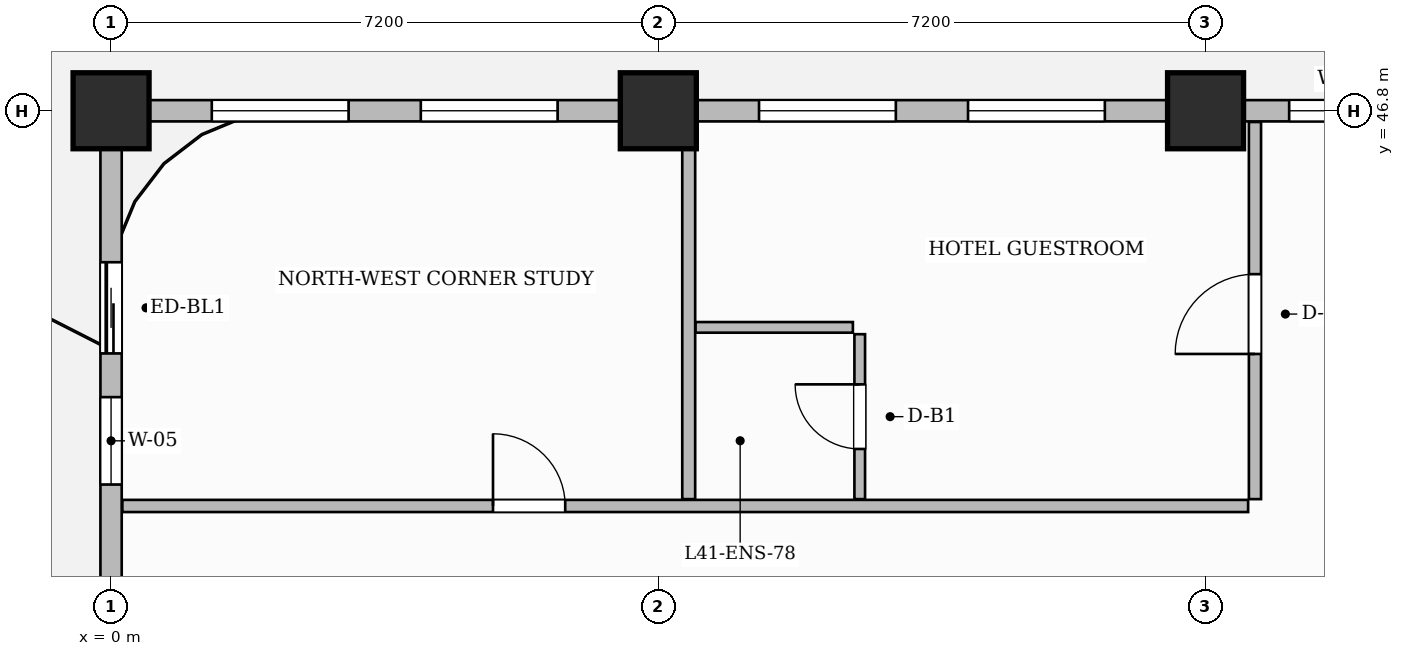
"""IFC4 building model, lengths in metres.
Left out: names, types, materials, properties, quantities, classifications, styles, units other than length and angle.
Written with IfcOpenShell. Run it as: python <this file> out.ifc"""

import sys

from ifc_helpers import new_model, si_unit, direction, frame, frame_2d, origin, origin_2d, place, context, subcontext, project, spatial, rectangle, extrude, source, transform, mapped, element, fill, save


model = new_model("IFC4")
c1 = context("Model", 3, precision=1e-05, world=origin(), true_north=direction((0.0, 1.0)))
c2 = subcontext(c1, "Body", "Model", "MODEL_VIEW")
j1 = project(units=[si_unit("LENGTHUNIT", "METRE"), si_unit("PLANEANGLEUNIT", "RADIAN")], contexts=[c1])
p1 = place(None, origin())
s1 = spatial("IfcSite", under=j1, at=p1, CompositionType="ELEMENT")
p2 = place(p1, origin())
s2 = spatial("IfcBuilding", under=s1, at=p2, CompositionType="ELEMENT")
p3 = place(p2, frame((0.0, 0.0, 165.7)))
s3 = spatial("IfcBuildingStorey", under=s2, at=p3, CompositionType="ELEMENT", Elevation=165.7)
m1 = source(origin(), c2, "Body", "SweptSolid", [
    extrude(rectangle(XDim=1.0, YDim=1.0, at=origin_2d()), origin(), (0.0, 0.0, 1.0), 3.85),
])
for number, where, z_axis, x_axis in (
    (1, (0.0, 46.8, 0.0), (0.0, 0.0, 1.0), (1.0, 0.0, 0.0)),
    (2, (7.2, 46.8, 0.0), (0.0, 0.0, 1.0), (1.0, 0.0, 0.0)),
    (3, (14.4, 46.8, 0.0), (0.0, 0.0, 1.0), (1.0, 0.0, 0.0)),
):
    element("IfcColumn", number, at=place(p3, frame(where, z_axis=z_axis, x_axis=x_axis)), inside=s3, PredefinedType="COLUMN", context=c2, shape_type="MappedRepresentation", body=[
        mapped(m1, transform((0.0, 0.0, 0.0), scale=1.0)),
    ])
p4 = place(p3, frame((15.05, 41.69, 0.0), z_axis=(0.0, 0.0, 1.0), x_axis=(0.0, 1.0, 0.0)))
e4 = element("IfcWall", 4, at=p4, inside=s3, PredefinedType="PARTITIONING", context=c2, shape_type="SweptSolid", body=[
    extrude(rectangle(XDim=4.962, YDim=0.16, at=frame_2d((2.481, 0.0))), origin(), (0.0, 0.0, 1.0), 3.6),
])
p5 = place(p4, frame((1.91, 0.0, 0.0)))
e5 = element("IfcOpeningElement", 5, at=p5, cuts=e4, PredefinedType="OPENING", context=c2, shape_type="SweptSolid", body=[
    extrude(rectangle(XDim=1.05, YDim=2.25, at=frame_2d((0.525, 1.125))), frame((0.0, 0.09, 0.0), z_axis=(0.0, -1.0, 0.0), x_axis=(1.0, 0.0, 0.0)), (0.0, 0.0, 1.0), 0.18),
])
p6 = place(p3, frame((7.6, 41.69, 0.0), z_axis=(0.0, 0.0, 1.0), x_axis=(0.0, 1.0, 0.0)))
e6 = element("IfcWall", 6, at=p6, inside=s3, PredefinedType="PARTITIONING", context=c2, shape_type="SweptSolid", body=[
    extrude(rectangle(XDim=4.87, YDim=0.17, at=frame_2d((2.435, 0.0))), origin(), (0.0, 0.0, 1.0), 3.6),
])
p7 = place(p3, frame((0.148, 41.6, 0.0), z_axis=(0.0, 0.0, 1.0), x_axis=(1.0, 0.0, 0.0)))
e7 = element("IfcWall", 7, at=p7, inside=s3, PredefinedType="PARTITIONING", context=c2, shape_type="SweptSolid", body=[
    extrude(rectangle(XDim=14.812, YDim=0.16, at=frame_2d((7.406, 0.0))), origin(), (0.0, 0.0, 1.0), 3.085),
])
p8 = place(p7, frame((4.877, 0.0, 0.0)))
e8 = element("IfcOpeningElement", 8, at=p8, cuts=e7, PredefinedType="OPENING", context=c2, shape_type="SweptSolid", body=[
    extrude(rectangle(XDim=0.95, YDim=2.15, at=frame_2d((0.475, 1.075))), frame((0.0, 0.09, 0.0), z_axis=(0.0, -1.0, 0.0), x_axis=(1.0, 0.0, 0.0)), (0.0, 0.0, 1.0), 0.18),
])
p9 = place(p3, frame((7.69, 43.95, 0.0), z_axis=(0.0, 0.0, 1.0), x_axis=(1.0, 0.0, 0.0)))
e9 = element("IfcWall", 9, at=p9, inside=s3, PredefinedType="PARTITIONING", context=c2, shape_type="SweptSolid", body=[
    extrude(rectangle(XDim=2.07, YDim=0.14, at=frame_2d((1.035, 0.0))), origin(), (0.0, 0.0, 1.0), 3.085),
])
p10 = place(p3, frame((9.85, 41.69, 0.0), z_axis=(0.0, 0.0, 1.0), x_axis=(0.0, 1.0, 0.0)))
e10 = element("IfcWall", 10, at=p10, inside=s3, PredefinedType="PARTITIONING", context=c2, shape_type="SweptSolid", body=[
    extrude(rectangle(XDim=2.17, YDim=0.14, at=frame_2d((1.085, 0.0))), origin(), (0.0, 0.0, 1.0), 3.6),
])
p11 = place(p10, frame((0.66, 0.0, 0.0)))
e11 = element("IfcOpeningElement", 11, at=p11, cuts=e10, PredefinedType="OPENING", context=c2, shape_type="SweptSolid", body=[
    extrude(rectangle(XDim=0.85, YDim=2.1, at=frame_2d((0.425, 1.05))), frame((0.0, 0.08, 0.0), z_axis=(0.0, -1.0, 0.0), x_axis=(1.0, 0.0, 0.0)), (0.0, 0.0, 1.0), 0.16),
])
p12 = place(p3, frame((0.0, 25.25, 0.0), z_axis=(0.0, 0.0, 1.0), x_axis=(0.0, 1.0, 0.0)))
e12 = element("IfcWall", 12, at=p12, inside=s3, PredefinedType="SOLIDWALL", context=c2, shape_type="SweptSolid", body=[
    extrude(rectangle(XDim=21.5, YDim=0.28, at=frame_2d((10.75, 0.0))), origin(), (0.0, 0.0, 1.0), 3.085),
])
p13 = place(p12, frame((18.357, 0.0, 0.0)))
e13 = element("IfcOpeningElement", 13, at=p13, cuts=e12, PredefinedType="OPENING", context=c2, shape_type="SweptSolid", body=[
    extrude(rectangle(XDim=1.2, YDim=2.2, at=frame_2d((0.6, 1.1))), frame((0.0, 0.15, 0.0), z_axis=(0.0, -1.0, 0.0), x_axis=(1.0, 0.0, 0.0)), (0.0, 0.0, 1.0), 0.3),
])
p14 = place(p12, frame((0.8, 0.0, 0.0)))
e14 = element("IfcOpeningElement", 14, at=p14, cuts=e12, PredefinedType="OPENING", context=c2, shape_type="SweptSolid", body=[
    extrude(rectangle(XDim=1.2, YDim=2.2, at=frame_2d((0.6, 1.1))), frame((0.0, 0.15, 0.0), z_axis=(0.0, -1.0, 0.0), x_axis=(1.0, 0.0, 0.0)), (0.0, 0.0, 1.0), 0.3),
])
p15 = place(p12, frame((3.425, 0.0, 0.8)))
e15 = element("IfcOpeningElement", 15, at=p15, cuts=e12, PredefinedType="OPENING", context=c2, shape_type="SweptSolid", body=[
    extrude(rectangle(XDim=1.8, YDim=1.85, at=frame_2d((0.9, 0.925))), frame((0.0, 0.15, 0.0), z_axis=(0.0, -1.0, 0.0), x_axis=(1.0, 0.0, 0.0)), (0.0, 0.0, 1.0), 0.3),
])
p16 = place(p12, frame((8.475, 0.0, 0.8)))
e16 = element("IfcOpeningElement", 16, at=p16, cuts=e12, PredefinedType="OPENING", context=c2, shape_type="SweptSolid", body=[
    extrude(rectangle(XDim=1.8, YDim=1.85, at=frame_2d((0.9, 0.925))), frame((0.0, 0.15, 0.0), z_axis=(0.0, -1.0, 0.0), x_axis=(1.0, 0.0, 0.0)), (0.0, 0.0, 1.0), 0.3),
])
p17 = place(p12, frame((11.225, 0.0, 0.8)))
e17 = element("IfcOpeningElement", 17, at=p17, cuts=e12, PredefinedType="OPENING", context=c2, shape_type="SweptSolid", body=[
    extrude(rectangle(XDim=1.8, YDim=1.85, at=frame_2d((0.9, 0.925))), frame((0.0, 0.15, 0.0), z_axis=(0.0, -1.0, 0.0), x_axis=(1.0, 0.0, 0.0)), (0.0, 0.0, 1.0), 0.3),
])
p18 = place(p12, frame((16.632, 0.0, 0.8)))
e18 = element("IfcOpeningElement", 18, at=p18, cuts=e12, PredefinedType="OPENING", context=c2, shape_type="SweptSolid", body=[
    extrude(rectangle(XDim=1.15, YDim=1.8, at=frame_2d((0.575, 0.9))), frame((0.0, 0.15, 0.0), z_axis=(0.0, -1.0, 0.0), x_axis=(1.0, 0.0, 0.0)), (0.0, 0.0, 1.0), 0.3),
])
p19 = place(p3, frame((0.0, 46.8, 0.0), z_axis=(0.0, 0.0, 1.0), x_axis=(1.0, 0.0, 0.0)))
e19 = element("IfcWall", 19, at=p19, inside=s3, PredefinedType="SOLIDWALL", context=c2, shape_type="SweptSolid", body=[
    extrude(rectangle(XDim=18.0, YDim=0.28, at=frame_2d((9.0, 0.0))), origin(), (0.0, 0.0, 1.0), 3.085),
])
p20 = place(p19, frame((1.325, 0.0, 0.8)))
e20 = element("IfcOpeningElement", 20, at=p20, cuts=e19, PredefinedType="OPENING", context=c2, shape_type="SweptSolid", body=[
    extrude(rectangle(XDim=1.8, YDim=1.85, at=frame_2d((0.9, 0.925))), frame((0.0, 0.15, 0.0), z_axis=(0.0, -1.0, 0.0), x_axis=(1.0, 0.0, 0.0)), (0.0, 0.0, 1.0), 0.3),
])
p21 = place(p19, frame((4.075, 0.0, 0.8)))
e21 = element("IfcOpeningElement", 21, at=p21, cuts=e19, PredefinedType="OPENING", context=c2, shape_type="SweptSolid", body=[
    extrude(rectangle(XDim=1.8, YDim=1.85, at=frame_2d((0.9, 0.925))), frame((0.0, 0.15, 0.0), z_axis=(0.0, -1.0, 0.0), x_axis=(1.0, 0.0, 0.0)), (0.0, 0.0, 1.0), 0.3),
])
p22 = place(p19, frame((8.525, 0.0, 0.8)))
e22 = element("IfcOpeningElement", 22, at=p22, cuts=e19, PredefinedType="OPENING", context=c2, shape_type="SweptSolid", body=[
    extrude(rectangle(XDim=1.8, YDim=1.85, at=frame_2d((0.9, 0.925))), frame((0.0, 0.15, 0.0), z_axis=(0.0, -1.0, 0.0), x_axis=(1.0, 0.0, 0.0)), (0.0, 0.0, 1.0), 0.3),
])
p23 = place(p19, frame((11.275, 0.0, 0.8)))
e23 = element("IfcOpeningElement", 23, at=p23, cuts=e19, PredefinedType="OPENING", context=c2, shape_type="SweptSolid", body=[
    extrude(rectangle(XDim=1.8, YDim=1.85, at=frame_2d((0.9, 0.925))), frame((0.0, 0.15, 0.0), z_axis=(0.0, -1.0, 0.0), x_axis=(1.0, 0.0, 0.0)), (0.0, 0.0, 1.0), 0.3),
])
p24 = place(p19, frame((15.5, 0.0, 0.8)))
e24 = element("IfcOpeningElement", 24, at=p24, cuts=e19, PredefinedType="OPENING", context=c2, shape_type="SweptSolid", body=[
    extrude(rectangle(XDim=1.4, YDim=1.85, at=frame_2d((0.7, 0.925))), frame((0.0, 0.15, 0.0), z_axis=(0.0, -1.0, 0.0), x_axis=(1.0, 0.0, 0.0)), (0.0, 0.0, 1.0), 0.3),
])
m2 = source(origin(), c2, "Body", "SweptSolid", [
    extrude(rectangle(XDim=0.95, YDim=2.15, at=frame_2d((0.475, 1.075))), frame((0.0, 0.025, 0.0), z_axis=(0.0, -1.0, 0.0), x_axis=(1.0, 0.0, 0.0)), (0.0, 0.0, 1.0), 0.05),
])
p25 = place(p8, origin())
e25 = element("IfcDoor", 25, at=p25, inside=s3, OperationType="SINGLE_SWING_LEFT", PredefinedType="DOOR", context=c2, shape_type="MappedRepresentation", body=[
    mapped(m2, transform((0.0, 0.0, 0.0), scale=1.0)),
])
fill(e8, e25)
m3 = source(origin(), c2, "Body", "SweptSolid", [
    extrude(rectangle(XDim=0.85, YDim=2.1, at=frame_2d((0.425, 1.05))), frame((0.0, 0.025, 0.0), z_axis=(0.0, -1.0, 0.0), x_axis=(1.0, 0.0, 0.0)), (0.0, 0.0, 1.0), 0.05),
])
p26 = place(p11, origin())
e26 = element("IfcDoor", 26, at=p26, inside=s3, OperationType="SINGLE_SWING_RIGHT", PredefinedType="DOOR", context=c2, shape_type="MappedRepresentation", body=[
    mapped(m3, transform((0.0, 0.0, 0.0), scale=1.0)),
])
fill(e11, e26)
m4 = source(origin(), c2, "Body", "SweptSolid", [
    extrude(rectangle(XDim=1.05, YDim=2.25, at=frame_2d((0.525, 1.125))), frame((0.0, 0.025, 0.0), z_axis=(0.0, -1.0, 0.0), x_axis=(1.0, 0.0, 0.0)), (0.0, 0.0, 1.0), 0.05),
])
p27 = place(p5, origin())
e27 = element("IfcDoor", 27, at=p27, inside=s3, OperationType="SINGLE_SWING_LEFT", PredefinedType="DOOR", context=c2, shape_type="MappedRepresentation", body=[
    mapped(m4, transform((0.0, 0.0, 0.0), scale=1.0)),
])
fill(e5, e27)
m5 = source(origin(), c2, "Body", "SweptSolid", [
    extrude(rectangle(XDim=1.2, YDim=2.2, at=frame_2d((0.6, 1.1))), frame((0.0, 0.025, 0.0), z_axis=(0.0, -1.0, 0.0), x_axis=(1.0, 0.0, 0.0)), (0.0, 0.0, 1.0), 0.05),
])
p28 = place(p13, origin())
e28 = element("IfcDoor", 28, at=p28, inside=s3, OperationType="SLIDING_TO_LEFT", PredefinedType="DOOR", context=c2, shape_type="MappedRepresentation", body=[
    mapped(m5, transform((0.0, 0.0, 0.0), scale=1.0)),
])
fill(e13, e28)
m6 = source(origin(), c2, "Body", "SweptSolid", [
    extrude(rectangle(XDim=1.15, YDim=1.8, at=frame_2d((0.575, 0.9))), frame((0.0, 0.03, 0.0), z_axis=(0.0, -1.0, 0.0), x_axis=(1.0, 0.0, 0.0)), (0.0, 0.0, 1.0), 0.06),
])
p29 = place(p18, origin())
e29 = element("IfcWindow", 29, at=p29, inside=s3, PartitioningType="SINGLE_PANEL", PredefinedType="WINDOW", context=c2, shape_type="MappedRepresentation", body=[
    mapped(m6, transform((0.0, 0.0, 0.0), scale=1.0)),
])
fill(e18, e29)
m7 = source(origin(), c2, "Body", "SweptSolid", [
    extrude(rectangle(XDim=1.8, YDim=1.85, at=frame_2d((0.9, 0.925))), frame((0.0, 0.03, 0.0), z_axis=(0.0, -1.0, 0.0), x_axis=(1.0, 0.0, 0.0)), (0.0, 0.0, 1.0), 0.06),
])
p30 = place(p20, origin())
e30 = element("IfcWindow", 30, at=p30, inside=s3, PartitioningType="DOUBLE_PANEL_VERTICAL", PredefinedType="WINDOW", context=c2, shape_type="MappedRepresentation", body=[
    mapped(m7, transform((0.0, 0.0, 0.0), scale=1.0)),
])
fill(e20, e30)
p31 = place(p21, origin())
e31 = element("IfcWindow", 31, at=p31, inside=s3, PartitioningType="DOUBLE_PANEL_VERTICAL", PredefinedType="WINDOW", context=c2, shape_type="MappedRepresentation", body=[
    mapped(m7, transform((0.0, 0.0, 0.0), scale=1.0)),
])
fill(e21, e31)
p32 = place(p22, origin())
e32 = element("IfcWindow", 32, at=p32, inside=s3, PartitioningType="DOUBLE_PANEL_VERTICAL", PredefinedType="WINDOW", context=c2, shape_type="MappedRepresentation", body=[
    mapped(m7, transform((0.0, 0.0, 0.0), scale=1.0)),
])
fill(e22, e32)
p33 = place(p23, origin())
e33 = element("IfcWindow", 33, at=p33, inside=s3, PartitioningType="DOUBLE_PANEL_VERTICAL", PredefinedType="WINDOW", context=c2, shape_type="MappedRepresentation", body=[
    mapped(m7, transform((0.0, 0.0, 0.0), scale=1.0)),
])
fill(e23, e33)
m8 = source(origin(), c2, "Body", "SweptSolid", [
    extrude(rectangle(XDim=1.4, YDim=1.85, at=frame_2d((0.7, 0.925))), frame((0.0, 0.03, 0.0), z_axis=(0.0, -1.0, 0.0), x_axis=(1.0, 0.0, 0.0)), (0.0, 0.0, 1.0), 0.06),
])
p34 = place(p24, origin())
e34 = element("IfcWindow", 34, at=p34, inside=s3, PartitioningType="SINGLE_PANEL", PredefinedType="WINDOW", context=c2, shape_type="MappedRepresentation", body=[
    mapped(m8, transform((0.0, 0.0, 0.0), scale=1.0)),
])
fill(e24, e34)
save(model, sys.argv[1])
